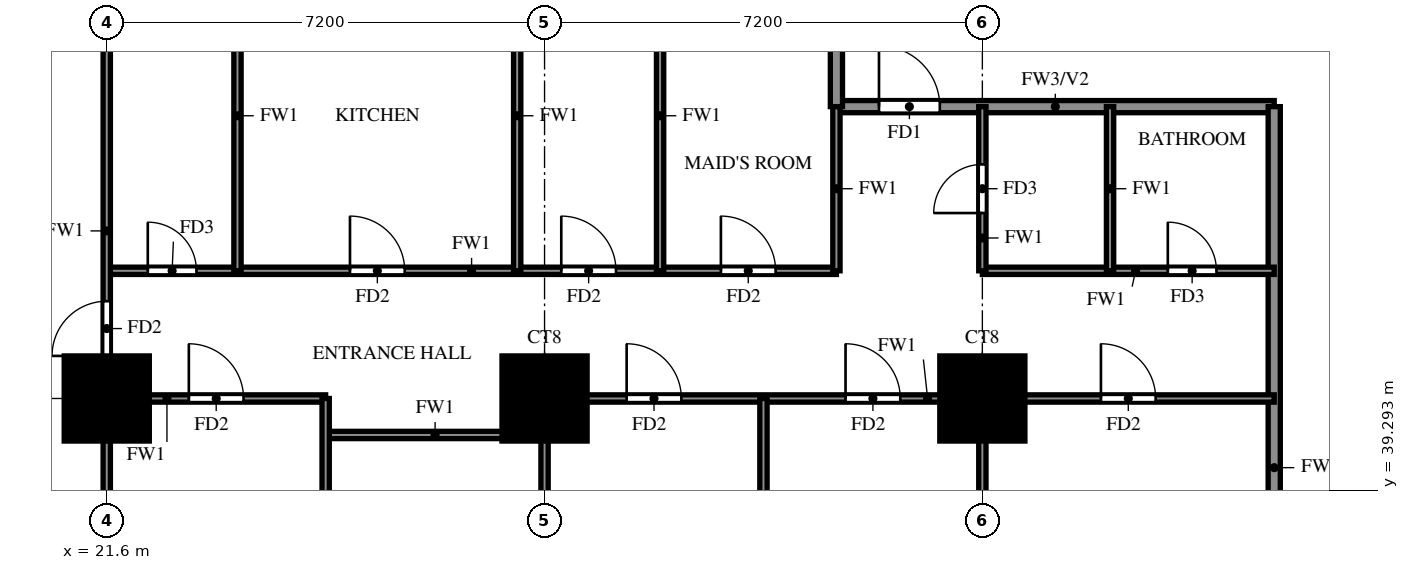
"""IFC4 building model, lengths in metres.
Left out: names, types, materials, properties, quantities, classifications, styles, units other than length and angle.
Written with IfcOpenShell. Run it as: python <this file> out.ifc"""

import sys

from ifc_helpers import new_model, si_unit, direction, frame, frame_2d, origin, origin_2d, place, context, subcontext, project, spatial, rectangle, extrude, source, transform, mapped, element, fill, save


model = new_model("IFC4")
c1 = context("Model", 3, precision=1e-05, world=origin(), true_north=direction((0.0, 1.0)))
c2 = subcontext(c1, "Body", "Model", "MODEL_VIEW")
j1 = project(units=[si_unit("LENGTHUNIT", "METRE"), si_unit("PLANEANGLEUNIT", "RADIAN")], contexts=[c1])
p1 = place(None, origin())
s1 = spatial("IfcSite", under=j1, at=p1, CompositionType="ELEMENT")
p2 = place(p1, origin())
s2 = spatial("IfcBuilding", under=s1, at=p2, CompositionType="ELEMENT")
p3 = place(p2, frame((0.0, 0.0, 55.0)))
s3 = spatial("IfcBuildingStorey", under=s2, at=p3, CompositionType="ELEMENT", Elevation=55.0)
m1 = source(origin(), c2, "Body", "SweptSolid", [
    extrude(rectangle(XDim=1.4, YDim=1.4, at=origin_2d()), origin(), (0.0, 0.0, 1.0), 3.18),
])
for number, where, z_axis, x_axis in (
    (1, (21.6, 40.8, 0.0), (0.0, 0.0, 1.0), (1.0, 0.0, 0.0)),
    (2, (28.8, 40.8, 0.0), (0.0, 0.0, 1.0), (1.0, 0.0, 0.0)),
    (3, (36.0, 40.8, 0.0), (0.0, 0.0, 1.0), (1.0, 0.0, 0.0)),
):
    element("IfcColumn", number, at=place(p3, frame(where, z_axis=z_axis, x_axis=x_axis)), inside=s3, PredefinedType="COLUMN", context=c2, shape_type="MappedRepresentation", body=[
        mapped(m1, transform((0.0, 0.0, 0.0))),
    ])
p4 = place(p3, frame((33.6, 45.6, 0.0), z_axis=(0.0, 0.0, 1.0), x_axis=(1.0, 0.0, 0.0)))
e4 = element("IfcWall", 4, at=p4, inside=s3, PredefinedType="SOLIDWALL", context=c2, shape_type="SweptSolid", body=[
    extrude(rectangle(XDim=7.2, YDim=0.2, at=frame_2d((3.6, 0.0))), origin(), (0.0, 0.0, 1.0), 3.18),
])
p5 = place(p4, frame((0.7, 0.0, 0.0)))
e5 = element("IfcOpeningElement", 5, at=p5, cuts=e4, PredefinedType="OPENING", context=c2, shape_type="SweptSolid", body=[
    extrude(rectangle(XDim=1.0, YDim=2.1, at=frame_2d((0.5, 1.05))), frame((0.0, 0.11, 0.0), z_axis=(0.0, -1.0, 0.0), x_axis=(1.0, 0.0, 0.0)), (0.0, 0.0, 1.0), 0.22),
])
p6 = place(p3, frame((33.6, 45.6, 0.0), z_axis=(0.0, 0.0, 1.0), x_axis=(0.0, 1.0, 0.0)))
e6 = element("IfcWall", 6, at=p6, inside=s3, PredefinedType="SOLIDWALL", context=c2, shape_type="SweptSolid", body=[
    extrude(rectangle(XDim=8.4, YDim=0.2, at=frame_2d((4.2, 0.0))), origin(), (0.0, 0.0, 1.0), 3.18),
])
p7 = place(p3, frame((40.8, 33.725, 0.0), z_axis=(0.0, 0.0, 1.0), x_axis=(0.0, 1.0, 0.0)))
e7 = element("IfcWall", 7, at=p7, inside=s3, PredefinedType="SOLIDWALL", context=c2, shape_type="SweptSolid", body=[
    extrude(rectangle(XDim=11.875, YDim=0.2, at=frame_2d((5.938, 0.0))), origin(), (0.0, 0.0, 1.0), 2.28),
])
p8 = place(p3, frame((25.2, 40.2, 0.0), z_axis=(0.0, 0.0, 1.0), x_axis=(1.0, 0.0, 0.0)))
e8 = element("IfcWall", 8, at=p8, inside=s3, PredefinedType="PARTITIONING", context=c2, shape_type="SweptSolid", body=[
    extrude(rectangle(XDim=3.6, YDim=0.12, at=frame_2d((1.8, 0.0))), origin(), (0.0, 0.0, 1.0), 3.18),
])
p9 = place(p3, frame((21.6, 40.8, 0.0), z_axis=(0.0, 0.0, 1.0), x_axis=(1.0, 0.0, 0.0)))
e9 = element("IfcWall", 9, at=p9, inside=s3, PredefinedType="PARTITIONING", context=c2, shape_type="SweptSolid", body=[
    extrude(rectangle(XDim=3.6, YDim=0.12, at=frame_2d((1.8, 0.0))), origin(), (0.0, 0.0, 1.0), 3.18),
])
p10 = place(p9, frame((1.35, 0.0, 0.0)))
e10 = element("IfcOpeningElement", 10, at=p10, cuts=e9, PredefinedType="OPENING", context=c2, shape_type="SweptSolid", body=[
    extrude(rectangle(XDim=0.9, YDim=2.1, at=frame_2d((0.45, 1.05))), frame((0.0, 0.07, 0.0), z_axis=(0.0, -1.0, 0.0), x_axis=(1.0, 0.0, 0.0)), (0.0, 0.0, 1.0), 0.14),
])
p11 = place(p3, frame((28.8, 40.8, 0.0), z_axis=(0.0, 0.0, 1.0), x_axis=(1.0, 0.0, 0.0)))
e11 = element("IfcWall", 11, at=p11, inside=s3, PredefinedType="PARTITIONING", context=c2, shape_type="SweptSolid", body=[
    extrude(rectangle(XDim=12.0, YDim=0.12, at=frame_2d((6.0, 0.0))), origin(), (0.0, 0.0, 1.0), 3.18),
])
p12 = place(p11, frame((1.35, 0.0, 0.0)))
e12 = element("IfcOpeningElement", 12, at=p12, cuts=e11, PredefinedType="OPENING", context=c2, shape_type="SweptSolid", body=[
    extrude(rectangle(XDim=0.9, YDim=2.1, at=frame_2d((0.45, 1.05))), frame((0.0, 0.07, 0.0), z_axis=(0.0, -1.0, 0.0), x_axis=(1.0, 0.0, 0.0)), (0.0, 0.0, 1.0), 0.14),
])
p13 = place(p11, frame((4.95, 0.0, 0.0)))
e13 = element("IfcOpeningElement", 13, at=p13, cuts=e11, PredefinedType="OPENING", context=c2, shape_type="SweptSolid", body=[
    extrude(rectangle(XDim=0.9, YDim=2.1, at=frame_2d((0.45, 1.05))), frame((0.0, 0.07, 0.0), z_axis=(0.0, -1.0, 0.0), x_axis=(1.0, 0.0, 0.0)), (0.0, 0.0, 1.0), 0.14),
])
p14 = place(p11, frame((9.15, 0.0, 0.0)))
e14 = element("IfcOpeningElement", 14, at=p14, cuts=e11, PredefinedType="OPENING", context=c2, shape_type="SweptSolid", body=[
    extrude(rectangle(XDim=0.9, YDim=2.1, at=frame_2d((0.45, 1.05))), frame((0.0, 0.07, 0.0), z_axis=(0.0, -1.0, 0.0), x_axis=(1.0, 0.0, 0.0)), (0.0, 0.0, 1.0), 0.14),
])
p15 = place(p3, frame((21.6, 42.9, 0.0), z_axis=(0.0, 0.0, 1.0), x_axis=(1.0, 0.0, 0.0)))
e15 = element("IfcWall", 15, at=p15, inside=s3, PredefinedType="PARTITIONING", context=c2, shape_type="SweptSolid", body=[
    extrude(rectangle(XDim=12.0, YDim=0.12, at=frame_2d((6.0, 0.0))), origin(), (0.0, 0.0, 1.0), 3.18),
])
p16 = place(p15, frame((0.675, 0.0, 0.0)))
e16 = element("IfcOpeningElement", 16, at=p16, cuts=e15, PredefinedType="OPENING", context=c2, shape_type="SweptSolid", body=[
    extrude(rectangle(XDim=0.8, YDim=2.1, at=frame_2d((0.4, 1.05))), frame((0.0, 0.07, 0.0), z_axis=(0.0, -1.0, 0.0), x_axis=(1.0, 0.0, 0.0)), (0.0, 0.0, 1.0), 0.14),
])
p17 = place(p15, frame((4.0, 0.0, 0.0)))
e17 = element("IfcOpeningElement", 17, at=p17, cuts=e15, PredefinedType="OPENING", context=c2, shape_type="SweptSolid", body=[
    extrude(rectangle(XDim=0.9, YDim=2.1, at=frame_2d((0.45, 1.05))), frame((0.0, 0.07, 0.0), z_axis=(0.0, -1.0, 0.0), x_axis=(1.0, 0.0, 0.0)), (0.0, 0.0, 1.0), 0.14),
])
p18 = place(p15, frame((7.475, 0.0, 0.0)))
e18 = element("IfcOpeningElement", 18, at=p18, cuts=e15, PredefinedType="OPENING", context=c2, shape_type="SweptSolid", body=[
    extrude(rectangle(XDim=0.9, YDim=2.1, at=frame_2d((0.45, 1.05))), frame((0.0, 0.07, 0.0), z_axis=(0.0, -1.0, 0.0), x_axis=(1.0, 0.0, 0.0)), (0.0, 0.0, 1.0), 0.14),
])
p19 = place(p15, frame((10.1, 0.0, 0.0)))
e19 = element("IfcOpeningElement", 19, at=p19, cuts=e15, PredefinedType="OPENING", context=c2, shape_type="SweptSolid", body=[
    extrude(rectangle(XDim=0.9, YDim=2.1, at=frame_2d((0.45, 1.05))), frame((0.0, 0.07, 0.0), z_axis=(0.0, -1.0, 0.0), x_axis=(1.0, 0.0, 0.0)), (0.0, 0.0, 1.0), 0.14),
])
p20 = place(p3, frame((36.0, 42.9, 0.0), z_axis=(0.0, 0.0, 1.0), x_axis=(1.0, 0.0, 0.0)))
e20 = element("IfcWall", 20, at=p20, inside=s3, PredefinedType="PARTITIONING", context=c2, shape_type="SweptSolid", body=[
    extrude(rectangle(XDim=4.8, YDim=0.12, at=frame_2d((2.4, 0.0))), origin(), (0.0, 0.0, 1.0), 3.18),
])
p21 = place(p20, frame((3.05, 0.0, 0.0)))
e21 = element("IfcOpeningElement", 21, at=p21, cuts=e20, PredefinedType="OPENING", context=c2, shape_type="SweptSolid", body=[
    extrude(rectangle(XDim=0.8, YDim=2.1, at=frame_2d((0.4, 1.05))), frame((0.0, 0.07, 0.0), z_axis=(0.0, -1.0, 0.0), x_axis=(1.0, 0.0, 0.0)), (0.0, 0.0, 1.0), 0.14),
])
p22 = place(p3, frame((21.6, 33.725, 0.0), z_axis=(0.0, 0.0, 1.0), x_axis=(0.0, 1.0, 0.0)))
e22 = element("IfcWall", 22, at=p22, inside=s3, PredefinedType="PARTITIONING", context=c2, shape_type="SweptSolid", body=[
    extrude(rectangle(XDim=17.875, YDim=0.12, at=frame_2d((8.938, 0.0))), origin(), (0.0, 0.0, 1.0), 3.18),
])
p23 = place(p22, frame((7.775, 0.0, 0.0)))
e23 = element("IfcOpeningElement", 23, at=p23, cuts=e22, PredefinedType="OPENING", context=c2, shape_type="SweptSolid", body=[
    extrude(rectangle(XDim=0.9, YDim=2.1, at=frame_2d((0.45, 1.05))), frame((0.0, 0.07, 0.0), z_axis=(0.0, -1.0, 0.0), x_axis=(1.0, 0.0, 0.0)), (0.0, 0.0, 1.0), 0.14),
])
p24 = place(p22, frame((15.625, 0.0, 0.0)))
e24 = element("IfcOpeningElement", 24, at=p24, cuts=e22, PredefinedType="OPENING", context=c2, shape_type="SweptSolid", body=[
    extrude(rectangle(XDim=0.9, YDim=2.1, at=frame_2d((0.45, 1.05))), frame((0.0, 0.07, 0.0), z_axis=(0.0, -1.0, 0.0), x_axis=(1.0, 0.0, 0.0)), (0.0, 0.0, 1.0), 0.14),
])
p25 = place(p3, frame((23.75, 42.9, 0.0), z_axis=(0.0, 0.0, 1.0), x_axis=(0.0, 1.0, 0.0)))
e25 = element("IfcWall", 25, at=p25, inside=s3, PredefinedType="PARTITIONING", context=c2, shape_type="SweptSolid", body=[
    extrude(rectangle(XDim=5.1, YDim=0.12, at=frame_2d((2.55, 0.0))), origin(), (0.0, 0.0, 1.0), 3.18),
])
p26 = place(p3, frame((25.2, 33.725, 0.0), z_axis=(0.0, 0.0, 1.0), x_axis=(0.0, 1.0, 0.0)))
e26 = element("IfcWall", 26, at=p26, inside=s3, PredefinedType="PARTITIONING", context=c2, shape_type="SweptSolid", body=[
    extrude(rectangle(XDim=7.075, YDim=0.12, at=frame_2d((3.538, 0.0))), origin(), (0.0, 0.0, 1.0), 2.28),
])
p27 = place(p26, frame((2.837, 0.0, 0.0)))
e27 = element("IfcOpeningElement", 27, at=p27, cuts=e26, PredefinedType="OPENING", context=c2, shape_type="SweptSolid", body=[
    extrude(rectangle(XDim=0.8, YDim=2.1, at=frame_2d((0.4, 1.05))), frame((0.0, 0.07, 0.0), z_axis=(0.0, -1.0, 0.0), x_axis=(1.0, 0.0, 0.0)), (0.0, 0.0, 1.0), 0.14),
])
p28 = place(p3, frame((28.35, 42.9, 0.0), z_axis=(0.0, 0.0, 1.0), x_axis=(0.0, 1.0, 0.0)))
e28 = element("IfcWall", 28, at=p28, inside=s3, PredefinedType="PARTITIONING", context=c2, shape_type="SweptSolid", body=[
    extrude(rectangle(XDim=5.1, YDim=0.12, at=frame_2d((2.55, 0.0))), origin(), (0.0, 0.0, 1.0), 3.18),
])
p29 = place(p3, frame((28.8, 33.725, 0.0), z_axis=(0.0, 0.0, 1.0), x_axis=(0.0, 1.0, 0.0)))
e29 = element("IfcWall", 29, at=p29, inside=s3, PredefinedType="PARTITIONING", context=c2, shape_type="SweptSolid", body=[
    extrude(rectangle(XDim=7.075, YDim=0.12, at=frame_2d((3.538, 0.0))), origin(), (0.0, 0.0, 1.0), 3.18),
])
p30 = place(p3, frame((30.7, 42.9, 0.0), z_axis=(0.0, 0.0, 1.0), x_axis=(0.0, 1.0, 0.0)))
e30 = element("IfcWall", 30, at=p30, inside=s3, PredefinedType="PARTITIONING", context=c2, shape_type="SweptSolid", body=[
    extrude(rectangle(XDim=5.1, YDim=0.12, at=frame_2d((2.55, 0.0))), origin(), (0.0, 0.0, 1.0), 3.18),
])
p31 = place(p3, frame((32.4, 33.725, 0.0), z_axis=(0.0, 0.0, 1.0), x_axis=(0.0, 1.0, 0.0)))
e31 = element("IfcWall", 31, at=p31, inside=s3, PredefinedType="PARTITIONING", context=c2, shape_type="SweptSolid", body=[
    extrude(rectangle(XDim=7.075, YDim=0.12, at=frame_2d((3.538, 0.0))), origin(), (0.0, 0.0, 1.0), 2.28),
])
p32 = place(p3, frame((33.6, 42.9, 0.0), z_axis=(0.0, 0.0, 1.0), x_axis=(0.0, 1.0, 0.0)))
e32 = element("IfcWall", 32, at=p32, inside=s3, PredefinedType="PARTITIONING", context=c2, shape_type="SweptSolid", body=[
    extrude(rectangle(XDim=2.7, YDim=0.12, at=frame_2d((1.35, 0.0))), origin(), (0.0, 0.0, 1.0), 3.18),
])
p33 = place(p3, frame((36.0, 33.725, 0.0), z_axis=(0.0, 0.0, 1.0), x_axis=(0.0, 1.0, 0.0)))
e33 = element("IfcWall", 33, at=p33, inside=s3, PredefinedType="PARTITIONING", context=c2, shape_type="SweptSolid", body=[
    extrude(rectangle(XDim=7.075, YDim=0.12, at=frame_2d((3.538, 0.0))), origin(), (0.0, 0.0, 1.0), 3.18),
])
p34 = place(p3, frame((36.0, 42.9, 0.0), z_axis=(0.0, 0.0, 1.0), x_axis=(0.0, 1.0, 0.0)))
e34 = element("IfcWall", 34, at=p34, inside=s3, PredefinedType="PARTITIONING", context=c2, shape_type="SweptSolid", body=[
    extrude(rectangle(XDim=2.7, YDim=0.12, at=frame_2d((1.35, 0.0))), origin(), (0.0, 0.0, 1.0), 3.18),
])
p35 = place(p34, frame((0.95, 0.0, 0.0)))
e35 = element("IfcOpeningElement", 35, at=p35, cuts=e34, PredefinedType="OPENING", context=c2, shape_type="SweptSolid", body=[
    extrude(rectangle(XDim=0.8, YDim=2.1, at=frame_2d((0.4, 1.05))), frame((0.0, 0.07, 0.0), z_axis=(0.0, -1.0, 0.0), x_axis=(1.0, 0.0, 0.0)), (0.0, 0.0, 1.0), 0.14),
])
p36 = place(p3, frame((38.1, 42.9, 0.0), z_axis=(0.0, 0.0, 1.0), x_axis=(0.0, 1.0, 0.0)))
e36 = element("IfcWall", 36, at=p36, inside=s3, PredefinedType="PARTITIONING", context=c2, shape_type="SweptSolid", body=[
    extrude(rectangle(XDim=2.7, YDim=0.12, at=frame_2d((1.35, 0.0))), origin(), (0.0, 0.0, 1.0), 3.18),
])
p37 = place(p5, origin())
e37 = element("IfcDoor", 37, at=p37, inside=s3, OperationType="SINGLE_SWING_LEFT", PredefinedType="DOOR", context=c2, shape_type="SweptSolid", body=[
    extrude(rectangle(XDim=1.0, YDim=2.1, at=frame_2d((0.5, 1.05))), frame((0.0, 0.025, 0.0), z_axis=(0.0, -1.0, 0.0), x_axis=(1.0, 0.0, 0.0)), (0.0, 0.0, 1.0), 0.05),
])
fill(e5, e37)
p38 = place(p23, origin())
e38 = element("IfcDoor", 38, at=p38, inside=s3, OperationType="SINGLE_SWING_RIGHT", PredefinedType="DOOR", context=c2, shape_type="SweptSolid", body=[
    extrude(rectangle(XDim=0.9, YDim=2.1, at=frame_2d((0.45, 1.05))), frame((0.0, 0.025, 0.0), z_axis=(0.0, -1.0, 0.0), x_axis=(1.0, 0.0, 0.0)), (0.0, 0.0, 1.0), 0.05),
])
fill(e23, e38)
p39 = place(p10, origin())
e39 = element("IfcDoor", 39, at=p39, inside=s3, OperationType="SINGLE_SWING_RIGHT", PredefinedType="DOOR", context=c2, shape_type="SweptSolid", body=[
    extrude(rectangle(XDim=0.9, YDim=2.1, at=frame_2d((0.45, 1.05))), frame((0.0, 0.025, 0.0), z_axis=(0.0, -1.0, 0.0), x_axis=(1.0, 0.0, 0.0)), (0.0, 0.0, 1.0), 0.05),
])
fill(e10, e39)
p40 = place(p12, origin())
e40 = element("IfcDoor", 40, at=p40, inside=s3, OperationType="SINGLE_SWING_LEFT", PredefinedType="DOOR", context=c2, shape_type="SweptSolid", body=[
    extrude(rectangle(XDim=0.9, YDim=2.1, at=frame_2d((0.45, 1.05))), frame((0.0, 0.025, 0.0), z_axis=(0.0, -1.0, 0.0), x_axis=(1.0, 0.0, 0.0)), (0.0, 0.0, 1.0), 0.05),
])
fill(e12, e40)
p41 = place(p13, origin())
e41 = element("IfcDoor", 41, at=p41, inside=s3, OperationType="SINGLE_SWING_RIGHT", PredefinedType="DOOR", context=c2, shape_type="SweptSolid", body=[
    extrude(rectangle(XDim=0.9, YDim=2.1, at=frame_2d((0.45, 1.05))), frame((0.0, 0.025, 0.0), z_axis=(0.0, -1.0, 0.0), x_axis=(1.0, 0.0, 0.0)), (0.0, 0.0, 1.0), 0.05),
])
fill(e13, e41)
p42 = place(p14, origin())
e42 = element("IfcDoor", 42, at=p42, inside=s3, OperationType="SINGLE_SWING_LEFT", PredefinedType="DOOR", context=c2, shape_type="SweptSolid", body=[
    extrude(rectangle(XDim=0.9, YDim=2.1, at=frame_2d((0.45, 1.05))), frame((0.0, 0.025, 0.0), z_axis=(0.0, -1.0, 0.0), x_axis=(1.0, 0.0, 0.0)), (0.0, 0.0, 1.0), 0.05),
])
fill(e14, e42)
p43 = place(p16, origin())
e43 = element("IfcDoor", 43, at=p43, inside=s3, OperationType="SINGLE_SWING_LEFT", PredefinedType="DOOR", context=c2, shape_type="SweptSolid", body=[
    extrude(rectangle(XDim=0.8, YDim=2.1, at=frame_2d((0.4, 1.05))), frame((0.0, 0.025, 0.0), z_axis=(0.0, -1.0, 0.0), x_axis=(1.0, 0.0, 0.0)), (0.0, 0.0, 1.0), 0.05),
])
fill(e16, e43)
p44 = place(p17, origin())
e44 = element("IfcDoor", 44, at=p44, inside=s3, OperationType="SINGLE_SWING_RIGHT", PredefinedType="DOOR", context=c2, shape_type="SweptSolid", body=[
    extrude(rectangle(XDim=0.9, YDim=2.1, at=frame_2d((0.45, 1.05))), frame((0.0, 0.025, 0.0), z_axis=(0.0, -1.0, 0.0), x_axis=(1.0, 0.0, 0.0)), (0.0, 0.0, 1.0), 0.05),
])
fill(e17, e44)
p45 = place(p18, origin())
e45 = element("IfcDoor", 45, at=p45, inside=s3, OperationType="SINGLE_SWING_LEFT", PredefinedType="DOOR", context=c2, shape_type="SweptSolid", body=[
    extrude(rectangle(XDim=0.9, YDim=2.1, at=frame_2d((0.45, 1.05))), frame((0.0, 0.025, 0.0), z_axis=(0.0, -1.0, 0.0), x_axis=(1.0, 0.0, 0.0)), (0.0, 0.0, 1.0), 0.05),
])
fill(e18, e45)
p46 = place(p19, origin())
e46 = element("IfcDoor", 46, at=p46, inside=s3, OperationType="SINGLE_SWING_LEFT", PredefinedType="DOOR", context=c2, shape_type="SweptSolid", body=[
    extrude(rectangle(XDim=0.9, YDim=2.1, at=frame_2d((0.45, 1.05))), frame((0.0, 0.025, 0.0), z_axis=(0.0, -1.0, 0.0), x_axis=(1.0, 0.0, 0.0)), (0.0, 0.0, 1.0), 0.05),
])
fill(e19, e46)
p47 = place(p35, origin())
e47 = element("IfcDoor", 47, at=p47, inside=s3, OperationType="SINGLE_SWING_RIGHT", PredefinedType="DOOR", context=c2, shape_type="SweptSolid", body=[
    extrude(rectangle(XDim=0.8, YDim=2.1, at=frame_2d((0.4, 1.05))), frame((0.0, 0.025, 0.0), z_axis=(0.0, -1.0, 0.0), x_axis=(1.0, 0.0, 0.0)), (0.0, 0.0, 1.0), 0.05),
])
fill(e35, e47)
p48 = place(p21, origin())
e48 = element("IfcDoor", 48, at=p48, inside=s3, OperationType="SINGLE_SWING_LEFT", PredefinedType="DOOR", context=c2, shape_type="SweptSolid", body=[
    extrude(rectangle(XDim=0.8, YDim=2.1, at=frame_2d((0.4, 1.05))), frame((0.0, 0.025, 0.0), z_axis=(0.0, -1.0, 0.0), x_axis=(1.0, 0.0, 0.0)), (0.0, 0.0, 1.0), 0.05),
])
fill(e21, e48)
save(model, sys.argv[1])
